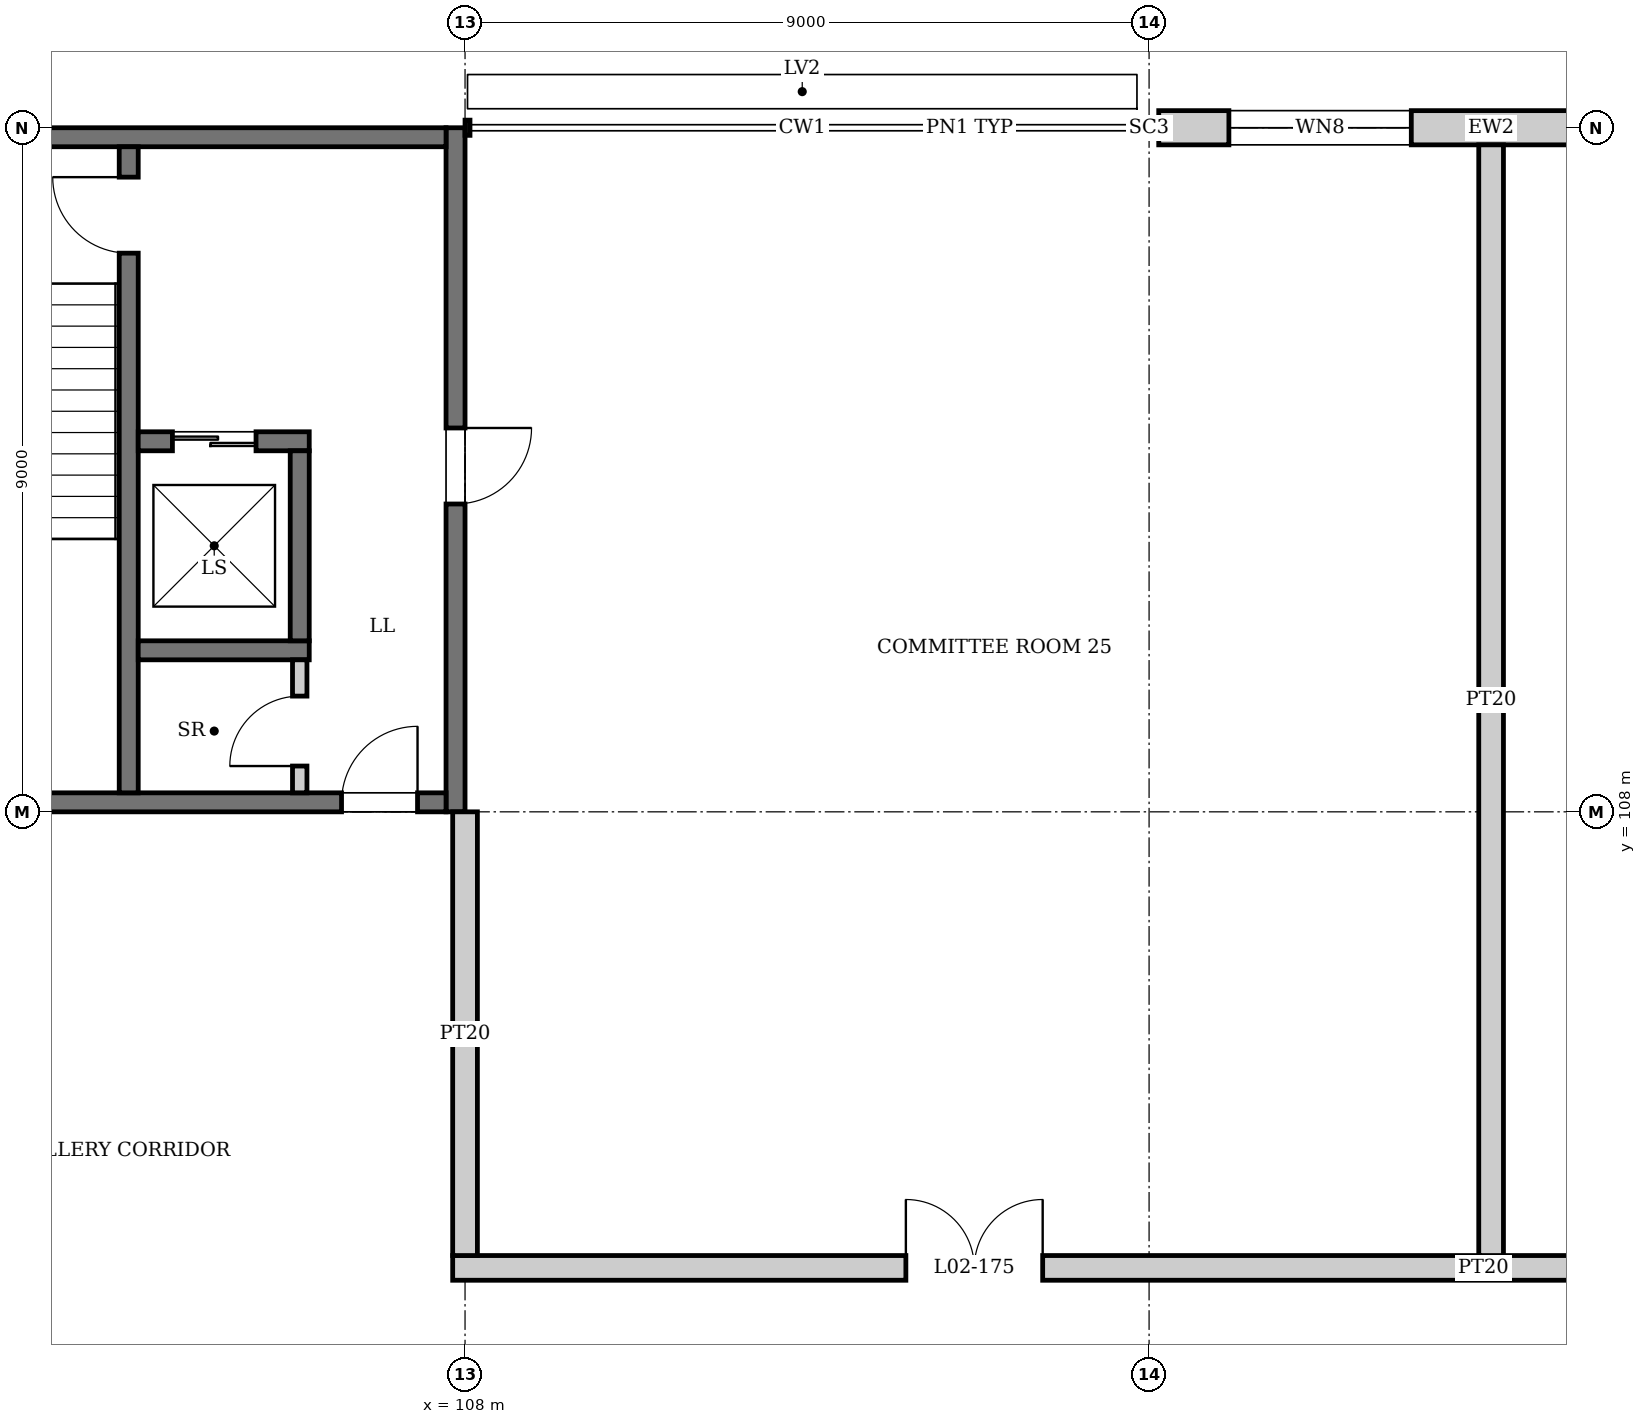
"""IFC4 building model, lengths in metres.
Left out: names, types, materials, properties, quantities, classifications, styles, units other than length and angle.
Written with IfcOpenShell. Run it as: python <this file> out.ifc"""

import sys

from ifc_helpers import new_model, si_unit, direction, frame, frame_2d, origin, origin_2d, place, context, subcontext, project, spatial, rectangle, i_section, extrude, element, fill, save


model = new_model("IFC4")
c1 = context("Model", 3, precision=1e-05, world=origin(), true_north=direction((0.0, 1.0)))
c2 = subcontext(c1, "Body", "Model", "MODEL_VIEW")
j1 = project(units=[si_unit("LENGTHUNIT", "METRE"), si_unit("PLANEANGLEUNIT", "RADIAN")], contexts=[c1])
p1 = place(None, origin())
s1 = spatial("IfcSite", under=j1, at=p1, CompositionType="ELEMENT")
p2 = place(p1, origin())
s2 = spatial("IfcBuilding", under=s1, at=p2, CompositionType="ELEMENT")
p3 = place(p2, frame((0.0, 0.0, 10.5)))
s3 = spatial("IfcBuildingStorey", under=s2, at=p3, CompositionType="ELEMENT", Elevation=10.5)
p4 = place(p3, frame((117.0, 117.0, 0.0), z_axis=(0.0, 0.0, 1.0), x_axis=(0.0, 1.0, 0.0)))
e1 = element("IfcColumn", 1, at=p4, inside=s3, PredefinedType="COLUMN", context=c2, shape_type="SweptSolid", body=[
    extrude(i_section(OverallWidth=0.254, OverallDepth=0.254, WebThickness=0.009, FlangeThickness=0.014, at=origin_2d()), origin(), (0.0, 0.0, 1.0), 4.5),
])
p5 = place(p3, frame((107.875, 108.0, 0.0), z_axis=(0.0, 0.0, 1.0), x_axis=(0.0, 1.0, 0.0)))
e2 = element("IfcWall", 2, at=p5, inside=s3, PredefinedType="SHEAR", context=c2, shape_type="SweptSolid", body=[
    extrude(rectangle(XDim=9.0, YDim=0.25, at=frame_2d((4.5, 0.0))), origin(), (0.0, 0.0, 1.0), 4.5),
])
p6 = place(p5, frame((4.05, 0.0, 0.0)))
e3 = element("IfcOpeningElement", 3, at=p6, cuts=e2, PredefinedType="OPENING", context=c2, shape_type="SweptSolid", body=[
    extrude(rectangle(XDim=1.0, YDim=2.1, at=frame_2d((0.5, 1.05))), frame((0.0, 0.135, 0.0), z_axis=(0.0, -1.0, 0.0), x_axis=(1.0, 0.0, 0.0)), (0.0, 0.0, 1.0), 0.27),
])
p7 = place(p3, frame((99.25, 108.125, 0.0), z_axis=(0.0, 0.0, 1.0), x_axis=(1.0, 0.0, 0.0)))
e4 = element("IfcWall", 4, at=p7, inside=s3, PredefinedType="SHEAR", context=c2, shape_type="SweptSolid", body=[
    extrude(rectangle(XDim=8.5, YDim=0.25, at=frame_2d((4.25, 0.0))), origin(), (0.0, 0.0, 1.0), 4.5),
])
p8 = place(p7, frame((7.125, 0.0, 0.0)))
e5 = element("IfcOpeningElement", 5, at=p8, cuts=e4, PredefinedType="OPENING", context=c2, shape_type="SweptSolid", body=[
    extrude(rectangle(XDim=1.0, YDim=2.1, at=frame_2d((0.5, 1.05))), frame((0.0, 0.135, 0.0), z_axis=(0.0, -1.0, 0.0), x_axis=(1.0, 0.0, 0.0)), (0.0, 0.0, 1.0), 0.27),
])
p9 = place(p3, frame((99.25, 116.875, 0.0), z_axis=(0.0, 0.0, 1.0), x_axis=(1.0, 0.0, 0.0)))
e6 = element("IfcWall", 6, at=p9, inside=s3, PredefinedType="SHEAR", context=c2, shape_type="SweptSolid", body=[
    extrude(rectangle(XDim=8.5, YDim=0.25, at=frame_2d((4.25, 0.0))), origin(), (0.0, 0.0, 1.0), 4.5),
])
p10 = place(p3, frame((117.127, 117.0, 0.0), z_axis=(0.0, 0.0, 1.0), x_axis=(1.0, 0.0, 0.0)))
e7 = element("IfcWall", 7, at=p10, inside=s3, PredefinedType="SOLIDWALL", context=c2, shape_type="SweptSolid", body=[
    extrude(rectangle(XDim=8.746, YDim=0.45, at=frame_2d((4.373, 0.0))), origin(), (0.0, 0.0, 1.0), 3.65),
])
p11 = place(p10, frame((0.923, 0.0, 0.9)))
e8 = element("IfcOpeningElement", 8, at=p11, cuts=e7, PredefinedType="OPENING", context=c2, shape_type="SweptSolid", body=[
    extrude(rectangle(XDim=2.4, YDim=2.1, at=frame_2d((1.2, 1.05))), frame((0.0, 0.235, 0.0), z_axis=(0.0, -1.0, 0.0), x_axis=(1.0, 0.0, 0.0)), (0.0, 0.0, 1.0), 0.47),
])
p12 = place(p10, frame((5.423, 0.0, 0.9)))
e9 = element("IfcOpeningElement", 9, at=p12, cuts=e7, PredefinedType="OPENING", context=c2, shape_type="SweptSolid", body=[
    extrude(rectangle(XDim=2.4, YDim=2.1, at=frame_2d((1.2, 1.05))), frame((0.0, 0.235, 0.0), z_axis=(0.0, -1.0, 0.0), x_axis=(1.0, 0.0, 0.0)), (0.0, 0.0, 1.0), 0.47),
])
p13 = place(p3, frame((103.575, 116.75, 0.0), z_axis=(0.0, 0.0, 1.0), x_axis=(0.0, -1.0, 0.0)))
e10 = element("IfcWall", 10, at=p13, inside=s3, PredefinedType="SOLIDWALL", context=c2, shape_type="SweptSolid", body=[
    extrude(rectangle(XDim=8.5, YDim=0.25, at=frame_2d((4.25, 0.0))), origin(), (0.0, 0.0, 1.0), 4.25),
])
p14 = place(p13, frame((0.4, 0.0, 0.0)))
e11 = element("IfcOpeningElement", 11, at=p14, cuts=e10, PredefinedType="OPENING", context=c2, shape_type="SweptSolid", body=[
    extrude(rectangle(XDim=1.0, YDim=2.1, at=frame_2d((0.5, 1.05))), frame((0.0, 0.135, 0.0), z_axis=(0.0, -1.0, 0.0), x_axis=(1.0, 0.0, 0.0)), (0.0, 0.0, 1.0), 0.27),
])
p15 = place(p3, frame((103.7, 110.125, 0.0), z_axis=(0.0, 0.0, 1.0), x_axis=(1.0, 0.0, 0.0)))
e12 = element("IfcWall", 12, at=p15, inside=s3, PredefinedType="SOLIDWALL", context=c2, shape_type="SweptSolid", body=[
    extrude(rectangle(XDim=2.25, YDim=0.25, at=frame_2d((1.125, 0.0))), origin(), (0.0, 0.0, 1.0), 4.5),
])
p16 = place(p3, frame((103.7, 112.875, 0.0), z_axis=(0.0, 0.0, 1.0), x_axis=(1.0, 0.0, 0.0)))
e13 = element("IfcWall", 13, at=p16, inside=s3, PredefinedType="SOLIDWALL", context=c2, shape_type="SweptSolid", body=[
    extrude(rectangle(XDim=2.25, YDim=0.25, at=frame_2d((1.125, 0.0))), origin(), (0.0, 0.0, 1.0), 4.5),
])
p17 = place(p16, frame((0.45, 0.0, 0.0)))
e14 = element("IfcOpeningElement", 14, at=p17, cuts=e13, PredefinedType="OPENING", context=c2, shape_type="SweptSolid", body=[
    extrude(rectangle(XDim=1.1, YDim=2.1, at=frame_2d((0.55, 1.05))), frame((0.0, 0.135, 0.0), z_axis=(0.0, -1.0, 0.0), x_axis=(1.0, 0.0, 0.0)), (0.0, 0.0, 1.0), 0.27),
])
p18 = place(p3, frame((105.825, 110.25, 0.0), z_axis=(0.0, 0.0, 1.0), x_axis=(0.0, 1.0, 0.0)))
e15 = element("IfcWall", 15, at=p18, inside=s3, PredefinedType="SOLIDWALL", context=c2, shape_type="SweptSolid", body=[
    extrude(rectangle(XDim=2.5, YDim=0.25, at=frame_2d((1.25, 0.0))), origin(), (0.0, 0.0, 1.0), 4.5),
])
p19 = place(p3, frame((107.837, 102.0, 0.0), z_axis=(0.0, 0.0, 1.0), x_axis=(1.0, 0.0, 0.0)))
e16 = element("IfcWall", 16, at=p19, inside=s3, PredefinedType="PARTITIONING", context=c2, shape_type="SweptSolid", body=[
    extrude(rectangle(XDim=27.325, YDim=0.325, at=frame_2d((13.663, 0.0))), origin(), (0.0, 0.0, 1.0), 3.65),
])
p20 = place(p19, frame((5.962, 0.0, 0.0)))
e17 = element("IfcOpeningElement", 17, at=p20, cuts=e16, PredefinedType="OPENING", context=c2, shape_type="SweptSolid", body=[
    extrude(rectangle(XDim=1.8, YDim=2.4, at=frame_2d((0.9, 1.2))), frame((0.0, 0.172, 0.0), z_axis=(0.0, -1.0, 0.0), x_axis=(1.0, 0.0, 0.0)), (0.0, 0.0, 1.0), 0.345),
])
p21 = place(p19, frame((19.462, 0.0, 0.0)))
e18 = element("IfcOpeningElement", 18, at=p21, cuts=e16, PredefinedType="OPENING", context=c2, shape_type="SweptSolid", body=[
    extrude(rectangle(XDim=1.8, YDim=2.4, at=frame_2d((0.9, 1.2))), frame((0.0, 0.172, 0.0), z_axis=(0.0, -1.0, 0.0), x_axis=(1.0, 0.0, 0.0)), (0.0, 0.0, 1.0), 0.345),
])
p22 = place(p3, frame((105.825, 108.25, 0.0), z_axis=(0.0, 0.0, 1.0), x_axis=(0.0, 1.0, 0.0)))
e19 = element("IfcWall", 19, at=p22, inside=s3, PredefinedType="PARTITIONING", context=c2, shape_type="SweptSolid", body=[
    extrude(rectangle(XDim=1.75, YDim=0.19, at=frame_2d((0.875, 0.0))), origin(), (0.0, 0.0, 1.0), 4.25),
])
p23 = place(p22, frame((0.353, 0.0, 0.0)))
e20 = element("IfcOpeningElement", 20, at=p23, cuts=e19, PredefinedType="OPENING", context=c2, shape_type="SweptSolid", body=[
    extrude(rectangle(XDim=0.92, YDim=2.1, at=frame_2d((0.46, 1.05))), frame((0.0, 0.105, 0.0), z_axis=(0.0, -1.0, 0.0), x_axis=(1.0, 0.0, 0.0)), (0.0, 0.0, 1.0), 0.21),
])
p24 = place(p3, frame((108.0, 102.163, 0.0), z_axis=(0.0, 0.0, 1.0), x_axis=(0.0, 1.0, 0.0)))
e21 = element("IfcWall", 21, at=p24, inside=s3, PredefinedType="PARTITIONING", context=c2, shape_type="SweptSolid", body=[
    extrude(rectangle(XDim=5.837, YDim=0.325, at=frame_2d((2.919, 0.0))), origin(), (0.0, 0.0, 1.0), 3.998),
])
p25 = place(p3, frame((121.5, 102.163, 0.0), z_axis=(0.0, 0.0, 1.0), x_axis=(0.0, 1.0, 0.0)))
e22 = element("IfcWall", 22, at=p25, inside=s3, PredefinedType="PARTITIONING", context=c2, shape_type="SweptSolid", body=[
    extrude(rectangle(XDim=14.612, YDim=0.325, at=frame_2d((7.306, 0.0))), origin(), (0.0, 0.0, 1.0), 3.65),
])
p26 = place(p11, origin())
e23 = element("IfcWindow", 23, at=p26, inside=s3, PartitioningType="SINGLE_PANEL", PredefinedType="WINDOW", context=c2, shape_type="SweptSolid", body=[
    extrude(rectangle(XDim=2.4, YDim=2.1, at=frame_2d((1.2, 1.05))), frame((0.0, 0.03, 0.0), z_axis=(0.0, -1.0, 0.0), x_axis=(1.0, 0.0, 0.0)), (0.0, 0.0, 1.0), 0.06),
])
fill(e8, e23)
p27 = place(p17, origin())
e24 = element("IfcDoor", 24, at=p27, inside=s3, OperationType="DOUBLE_DOOR_SLIDING", PredefinedType="DOOR", context=c2, shape_type="SweptSolid", body=[
    extrude(rectangle(XDim=1.1, YDim=2.1, at=frame_2d((0.55, 1.05))), frame((0.0, 0.025, 0.0), z_axis=(0.0, -1.0, 0.0), x_axis=(1.0, 0.0, 0.0)), (0.0, 0.0, 1.0), 0.05),
])
fill(e14, e24)
p28 = place(p14, frame((1.0, 0.0, 0.0), z_axis=(0.0, 0.0, 1.0), x_axis=(-1.0, 0.0, 0.0)))
e25 = element("IfcDoor", 25, at=p28, inside=s3, OperationType="SINGLE_SWING_RIGHT", PredefinedType="DOOR", context=c2, shape_type="SweptSolid", body=[
    extrude(rectangle(XDim=1.0, YDim=2.1, at=frame_2d((0.5, 1.05))), frame((0.0, 0.025, 0.0), z_axis=(0.0, -1.0, 0.0), x_axis=(1.0, 0.0, 0.0)), (0.0, 0.0, 1.0), 0.05),
])
fill(e11, e25)
p29 = place(p23, origin())
e26 = element("IfcDoor", 26, at=p29, inside=s3, OperationType="SINGLE_SWING_LEFT", PredefinedType="DOOR", context=c2, shape_type="SweptSolid", body=[
    extrude(rectangle(XDim=0.92, YDim=2.1, at=frame_2d((0.46, 1.05))), frame((0.0, 0.025, 0.0), z_axis=(0.0, -1.0, 0.0), x_axis=(1.0, 0.0, 0.0)), (0.0, 0.0, 1.0), 0.05),
])
fill(e20, e26)
p30 = place(p8, origin())
e27 = element("IfcDoor", 27, at=p30, inside=s3, OperationType="SINGLE_SWING_RIGHT", PredefinedType="DOOR", context=c2, shape_type="SweptSolid", body=[
    extrude(rectangle(XDim=1.0, YDim=2.1, at=frame_2d((0.5, 1.05))), frame((0.0, 0.025, 0.0), z_axis=(0.0, -1.0, 0.0), x_axis=(1.0, 0.0, 0.0)), (0.0, 0.0, 1.0), 0.05),
])
fill(e5, e27)
p31 = place(p6, frame((1.0, 0.0, 0.0), z_axis=(0.0, 0.0, 1.0), x_axis=(-1.0, 0.0, 0.0)))
e28 = element("IfcDoor", 28, at=p31, inside=s3, OperationType="SINGLE_SWING_LEFT", PredefinedType="DOOR", context=c2, shape_type="SweptSolid", body=[
    extrude(rectangle(XDim=1.0, YDim=2.1, at=frame_2d((0.5, 1.05))), frame((0.0, 0.025, 0.0), z_axis=(0.0, -1.0, 0.0), x_axis=(1.0, 0.0, 0.0)), (0.0, 0.0, 1.0), 0.05),
])
fill(e3, e28)
p32 = place(p20, origin())
e29 = element("IfcDoor", 29, at=p32, inside=s3, OperationType="DOUBLE_DOOR_SINGLE_SWING", PredefinedType="DOOR", context=c2, shape_type="SweptSolid", body=[
    extrude(rectangle(XDim=1.8, YDim=2.4, at=frame_2d((0.9, 1.2))), frame((0.0, 0.025, 0.0), z_axis=(0.0, -1.0, 0.0), x_axis=(1.0, 0.0, 0.0)), (0.0, 0.0, 1.0), 0.05),
])
fill(e17, e29)
save(model, sys.argv[1])
